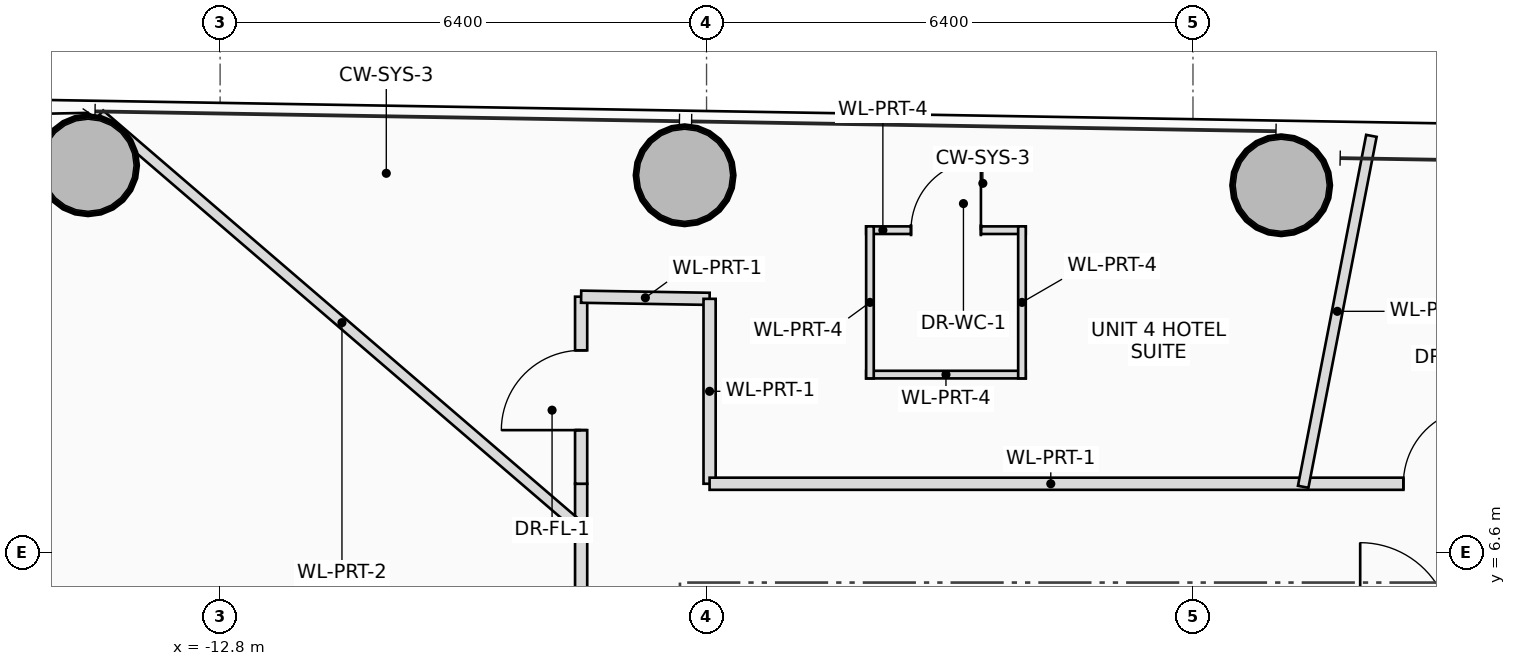
"""IFC4 building model, lengths in metres.
Left out: names, types, materials, properties, quantities, classifications, styles, units other than length and angle.
Written with IfcOpenShell. Run it as: python <this file> out.ifc"""

import sys

from ifc_helpers import new_model, si_unit, direction, frame, frame_2d, origin, origin_2d, place, context, subcontext, project, spatial, rectangle, hollow_circle, extrude, source, transform, mapped, element, fill, save


model = new_model("IFC4")
c1 = context("Model", 3, precision=1e-05, world=origin(), true_north=direction((0.0, 1.0)))
c2 = subcontext(c1, "Body", "Model", "MODEL_VIEW")
j1 = project(units=[si_unit("LENGTHUNIT", "METRE"), si_unit("PLANEANGLEUNIT", "RADIAN")], contexts=[c1])
p1 = place(None, origin())
s1 = spatial("IfcSite", under=j1, at=p1, CompositionType="ELEMENT")
p2 = place(p1, origin())
s2 = spatial("IfcBuilding", under=s1, at=p2, CompositionType="ELEMENT")
p3 = place(p2, frame((0.0, 0.0, 150.2)))
s3 = spatial("IfcBuildingStorey", under=s2, at=p3, CompositionType="ELEMENT", Elevation=150.2)
m1 = source(origin(), c2, "Body", "SweptSolid", [
    extrude(hollow_circle(Radius=0.65, WallThickness=0.045, at=origin_2d()), origin(), (0.0, 0.0, 1.0), 3.45),
])
for number, where, z_axis, x_axis in (
    (1, (1.16, 11.427, 0.0), (0.0, 0.0, 1.0), (1.0, 0.0, 0.0)),
    (2, (-6.688, 11.558, 0.0), (0.0, 0.0, 1.0), (1.0, 0.0, 0.0)),
    (3, (-14.538, 11.69, 0.0), (0.0, 0.0, 1.0), (1.0, 0.0, 0.0)),
):
    element("IfcColumn", number, at=place(p3, frame(where, z_axis=z_axis, x_axis=x_axis)), inside=s3, PredefinedType="COLUMN", context=c2, shape_type="MappedRepresentation", body=[
        mapped(m1, transform((0.0, 0.0, 0.0), scale=1.0)),
    ])
p4 = place(p3, frame((-4.3, 10.836, 0.0), z_axis=(0.0, 0.0, 1.0), x_axis=(1.0, 0.0, 0.0)))
e4 = element("IfcWall", 4, at=p4, inside=s3, PredefinedType="PARTITIONING", context=c2, shape_type="SweptSolid", body=[
    extrude(rectangle(XDim=2.1, YDim=0.1, at=frame_2d((1.05, 0.0))), origin(), (0.0, 0.0, 1.0), 3.21),
])
p5 = place(p4, frame((0.59, 0.0, 0.0)))
e5 = element("IfcOpeningElement", 5, at=p5, cuts=e4, PredefinedType="OPENING", context=c2, shape_type="SweptSolid", body=[
    extrude(rectangle(XDim=0.92, YDim=2.1, at=frame_2d((0.46, 1.05))), frame((0.0, 0.06, 0.0), z_axis=(0.0, -1.0, 0.0), x_axis=(1.0, 0.0, 0.0)), (0.0, 0.0, 1.0), 0.12),
])
p6 = place(p3, frame((-2.2, 8.936, 0.0), z_axis=(0.0, 0.0, 1.0), x_axis=(-1.0, 0.0, 0.0)))
e6 = element("IfcWall", 6, at=p6, inside=s3, PredefinedType="PARTITIONING", context=c2, shape_type="SweptSolid", body=[
    extrude(rectangle(XDim=2.1, YDim=0.1, at=frame_2d((1.05, 0.0))), origin(), (0.0, 0.0, 1.0), 3.21),
])
for number, where, z_axis, x_axis in (
    (7, (-2.25, 10.886, 0.0), (0.0, 0.0, 1.0), (0.0, -1.0, 0.0)),
    (8, (-4.25, 8.886, 0.0), (0.0, 0.0, 1.0), (0.0, 1.0, 0.0)),
):
    element("IfcWall", number, at=place(p3, frame(where, z_axis=z_axis, x_axis=x_axis)), inside=s3, PredefinedType="PARTITIONING", context=c2, shape_type="SweptSolid", body=[
        extrude(rectangle(XDim=2.0, YDim=0.1, at=frame_2d((1.0, 0.0))), origin(), (0.0, 0.0, 1.0), 2.865),
    ])
p7 = place(p3, frame((-8.05, -7.5, 0.0), z_axis=(0.0, 0.0, 1.0), x_axis=(0.0, 1.0, 0.0)))
e9 = element("IfcWall", 9, at=p7, inside=s3, PredefinedType="PARTITIONING", context=c2, shape_type="SweptSolid", body=[
    extrude(rectangle(XDim=15.0, YDim=0.16, at=frame_2d((7.5, 0.0))), origin(), (0.0, 0.0, 1.0), 2.565),
])
p8 = place(p7, frame((7.0, 0.0, 0.0)))
e10 = element("IfcOpeningElement", 10, at=p8, cuts=e9, PredefinedType="OPENING", context=c2, shape_type="SweptSolid", body=[
    extrude(rectangle(XDim=1.0, YDim=2.25, at=frame_2d((0.5, 1.125))), frame((0.0, 0.09, 0.0), z_axis=(0.0, -1.0, 0.0), x_axis=(1.0, 0.0, 0.0)), (0.0, 0.0, 1.0), 0.18),
])
p9 = place(p3, frame((-8.05, 7.5, 0.0), z_axis=(0.0, 0.0, 1.0), x_axis=(0.0, 1.0, 0.0)))
e11 = element("IfcWall", 11, at=p9, inside=s3, PredefinedType="PARTITIONING", context=c2, shape_type="SweptSolid", body=[
    extrude(rectangle(XDim=2.461, YDim=0.16, at=frame_2d((1.23, 0.0))), origin(), (0.0, 0.0, 1.0), 2.765),
])
p10 = place(p9, frame((0.706, 0.0, 0.0)))
e12 = element("IfcOpeningElement", 12, at=p10, cuts=e11, PredefinedType="OPENING", context=c2, shape_type="SweptSolid", body=[
    extrude(rectangle(XDim=1.05, YDim=2.2, at=frame_2d((0.525, 1.1))), frame((0.0, 0.09, 0.0), z_axis=(0.0, -1.0, 0.0), x_axis=(1.0, 0.0, 0.0)), (0.0, 0.0, 1.0), 0.18),
])
p11 = place(p3, frame((-8.05, 9.961, 0.0), z_axis=(0.0, 0.0, 1.0), x_axis=(0.999859611566, -0.016755809729, 0.0)))
e13 = element("IfcWall", 13, at=p11, inside=s3, PredefinedType="PARTITIONING", context=c2, shape_type="SweptSolid", body=[
    extrude(rectangle(XDim=1.69, YDim=0.16, at=frame_2d((0.845, 0.0))), origin(), (0.0, 0.0, 1.0), 2.565),
])
p12 = place(p3, frame((-6.36, 9.933, 0.0), z_axis=(0.0, 0.0, 1.0), x_axis=(0.0, -1.0, 0.0)))
e14 = element("IfcWall", 14, at=p12, inside=s3, PredefinedType="PARTITIONING", context=c2, shape_type="SweptSolid", body=[
    extrude(rectangle(XDim=2.433, YDim=0.16, at=frame_2d((1.216, 0.0))), origin(), (0.0, 0.0, 1.0), 2.565),
])
p13 = place(p3, frame((-6.36, 7.5, 0.0), z_axis=(0.0, 0.0, 1.0), x_axis=(1.0, 0.0, 0.0)))
e15 = element("IfcWall", 15, at=p13, inside=s3, PredefinedType="PARTITIONING", context=c2, shape_type="SweptSolid", body=[
    extrude(rectangle(XDim=11.61, YDim=0.16, at=frame_2d((5.805, 0.0))), origin(), (0.0, 0.0, 1.0), 2.565),
])
p14 = place(p13, frame((9.128, 0.0, 0.0)))
e16 = element("IfcOpeningElement", 16, at=p14, cuts=e15, PredefinedType="OPENING", context=c2, shape_type="SweptSolid", body=[
    extrude(rectangle(XDim=1.0, YDim=2.25, at=frame_2d((0.5, 1.125))), frame((0.0, 0.09, 0.0), z_axis=(0.0, -1.0, 0.0), x_axis=(1.0, 0.0, 0.0)), (0.0, 0.0, 1.0), 0.18),
])
p15 = place(p3, frame((1.45, 7.46, 0.0), z_axis=(0.0, 0.0, 1.0), x_axis=(0.190762676882, 0.981636185717, 0.0)))
e17 = element("IfcWall", 17, at=p15, inside=s3, PredefinedType="PARTITIONING", context=c2, shape_type="SweptSolid", body=[
    extrude(rectangle(XDim=4.703, YDim=0.14, at=frame_2d((2.352, 0.0))), origin(), (0.0, 0.0, 1.0), 2.565),
])
p16 = place(p3, frame((-8.01, 6.882, 0.0), z_axis=(0.0, 0.0, 1.0), x_axis=(-0.758515743862, 0.651654714026, 0.0)))
e18 = element("IfcWall", 18, at=p16, inside=s3, PredefinedType="PARTITIONING", context=c2, shape_type="SweptSolid", body=[
    extrude(rectangle(XDim=8.403, YDim=0.14, at=frame_2d((4.202, 0.0))), origin(), (0.0, 0.0, 1.0), 2.565),
])
p17 = place(p5, origin())
e19 = element("IfcDoor", 19, at=p17, inside=s3, OperationType="SINGLE_SWING_RIGHT", PredefinedType="DOOR", context=c2, shape_type="SweptSolid", body=[
    extrude(rectangle(XDim=0.92, YDim=2.1, at=frame_2d((0.46, 1.05))), frame((0.0, 0.025, 0.0), z_axis=(0.0, -1.0, 0.0), x_axis=(1.0, 0.0, 0.0)), (0.0, 0.0, 1.0), 0.05),
])
fill(e5, e19)
p18 = place(p10, origin())
e20 = element("IfcDoor", 20, at=p18, inside=s3, OperationType="SINGLE_SWING_LEFT", PredefinedType="DOOR", context=c2, shape_type="SweptSolid", body=[
    extrude(rectangle(XDim=1.05, YDim=2.2, at=frame_2d((0.525, 1.1))), frame((0.0, 0.025, 0.0), z_axis=(0.0, -1.0, 0.0), x_axis=(1.0, 0.0, 0.0)), (0.0, 0.0, 1.0), 0.05),
])
fill(e12, e20)
p19 = place(p14, origin())
e21 = element("IfcDoor", 21, at=p19, inside=s3, OperationType="SINGLE_SWING_RIGHT", PredefinedType="DOOR", context=c2, shape_type="SweptSolid", body=[
    extrude(rectangle(XDim=1.0, YDim=2.25, at=frame_2d((0.5, 1.125))), frame((0.0, 0.025, 0.0), z_axis=(0.0, -1.0, 0.0), x_axis=(1.0, 0.0, 0.0)), (0.0, 0.0, 1.0), 0.05),
])
fill(e16, e21)
save(model, sys.argv[1])
